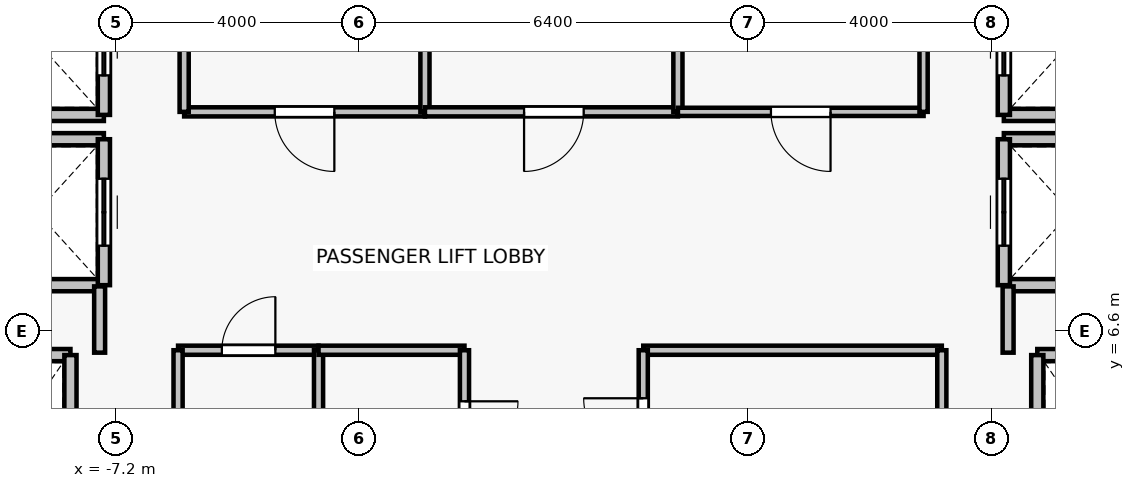
"""IFC4 building model, lengths in metres.
Left out: names, types, materials, properties, quantities, classifications, styles, units other than length and angle.
Written with IfcOpenShell. Run it as: python <this file> out.ifc"""

import sys

from ifc_helpers import new_model, si_unit, direction, frame, frame_2d, origin, place, context, subcontext, project, spatial, rectangle, extrude, source, transform, mapped, element, fill, save


model = new_model("IFC4")
c1 = context("Model", 3, precision=1e-05, world=origin(), true_north=direction((0.0, 1.0)))
c2 = subcontext(c1, "Body", "Model", "MODEL_VIEW")
j1 = project(units=[si_unit("LENGTHUNIT", "METRE"), si_unit("PLANEANGLEUNIT", "RADIAN")], contexts=[c1])
p1 = place(None, origin())
s1 = spatial("IfcSite", under=j1, at=p1, CompositionType="ELEMENT")
p2 = place(p1, origin())
s2 = spatial("IfcBuilding", under=s1, at=p2, CompositionType="ELEMENT")
p3 = place(p2, frame((0.0, 0.0, 225.4)))
s3 = spatial("IfcBuildingStorey", under=s2, at=p3, CompositionType="ELEMENT", Elevation=225.4)
p4 = place(p3, frame((-9.95, 6.2, 0.0), z_axis=(0.0, 0.0, 1.0), x_axis=(1.0, 0.0, 0.0)))
e1 = element("IfcWall", 1, at=p4, inside=s3, PredefinedType="SOLIDWALL", context=c2, shape_type="SweptSolid", body=[
    extrude(rectangle(XDim=2.0, YDim=0.2, at=frame_2d((1.0, 0.0))), origin(), (0.0, 0.0, 1.0), 3.075),
])
p5 = place(p3, frame((-7.95, 6.2, 0.0), z_axis=(0.0, 0.0, 1.0), x_axis=(0.0, -1.0, 0.0)))
e2 = element("IfcWall", 2, at=p5, inside=s3, PredefinedType="SOLIDWALL", context=c2, shape_type="SweptSolid", body=[
    extrude(rectangle(XDim=2.8, YDim=0.2, at=frame_2d((1.4, 0.0))), origin(), (0.0, 0.0, 1.0), 3.075),
])
p6 = place(p3, frame((7.95, 6.2, 0.0), z_axis=(0.0, 0.0, 1.0), x_axis=(1.0, 0.0, 0.0)))
e3 = element("IfcWall", 3, at=p6, inside=s3, PredefinedType="SOLIDWALL", context=c2, shape_type="SweptSolid", body=[
    extrude(rectangle(XDim=2.0, YDim=0.2, at=frame_2d((1.0, 0.0))), origin(), (0.0, 0.0, 1.0), 3.075),
])
p7 = place(p3, frame((7.95, 3.4, 0.0), z_axis=(0.0, 0.0, 1.0), x_axis=(0.0, 1.0, 0.0)))
e4 = element("IfcWall", 4, at=p7, inside=s3, PredefinedType="SOLIDWALL", context=c2, shape_type="SweptSolid", body=[
    extrude(rectangle(XDim=2.8, YDim=0.2, at=frame_2d((1.4, 0.0))), origin(), (0.0, 0.0, 1.0), 3.075),
])
for number, where, z_axis, x_axis in (
    (5, (-7.4, 7.35, 0.0), (0.0, 0.0, 1.0), (-1.0, 0.0, 0.0)),
    (6, (-9.6, 9.75, 0.0), (0.0, 0.0, 1.0), (1.0, 0.0, 0.0)),
):
    element("IfcWall", number, at=place(p3, frame(where, z_axis=z_axis, x_axis=x_axis)), inside=s3, PredefinedType="SOLIDWALL", context=c2, shape_type="SweptSolid", body=[
        extrude(rectangle(XDim=2.2, YDim=0.2, at=frame_2d((1.1, 0.0))), origin(), (0.0, 0.0, 1.0), 2.615),
    ])
p8 = place(p3, frame((-7.4, 9.75, 0.0), z_axis=(0.0, 0.0, 1.0), x_axis=(0.0, -1.0, 0.0)))
e7 = element("IfcWall", 7, at=p8, inside=s3, PredefinedType="SOLIDWALL", context=c2, shape_type="SweptSolid", body=[
    extrude(rectangle(XDim=2.4, YDim=0.2, at=frame_2d((1.2, 0.0))), origin(), (0.0, 0.0, 1.0), 2.615),
])
p9 = place(p8, frame((0.65, 0.0, 0.0)))
e8 = element("IfcOpeningElement", 8, at=p9, cuts=e7, PredefinedType="OPENING", context=c2, shape_type="SweptSolid", body=[
    extrude(rectangle(XDim=1.1, YDim=2.2, at=frame_2d((0.55, 1.1))), frame((0.0, 0.11, 0.0), z_axis=(0.0, -1.0, 0.0), x_axis=(1.0, 0.0, 0.0)), (0.0, 0.0, 1.0), 0.22),
])
p10 = place(p3, frame((-7.4, 10.15, 0.0), z_axis=(0.0, 0.0, 1.0), x_axis=(-1.0, 0.0, 0.0)))
e9 = element("IfcWall", 9, at=p10, inside=s3, PredefinedType="SOLIDWALL", context=c2, shape_type="SweptSolid", body=[
    extrude(rectangle(XDim=2.2, YDim=0.2, at=frame_2d((1.1, 0.0))), origin(), (0.0, 0.0, 1.0), 2.615),
])
p11 = place(p3, frame((-7.4, 12.55, 0.0), z_axis=(0.0, 0.0, 1.0), x_axis=(0.0, -1.0, 0.0)))
e10 = element("IfcWall", 10, at=p11, inside=s3, PredefinedType="SOLIDWALL", context=c2, shape_type="SweptSolid", body=[
    extrude(rectangle(XDim=2.4, YDim=0.2, at=frame_2d((1.2, 0.0))), origin(), (0.0, 0.0, 1.0), 2.615),
])
p12 = place(p11, frame((0.65, 0.0, 0.0)))
e11 = element("IfcOpeningElement", 11, at=p12, cuts=e10, PredefinedType="OPENING", context=c2, shape_type="SweptSolid", body=[
    extrude(rectangle(XDim=1.1, YDim=2.2, at=frame_2d((0.55, 1.1))), frame((0.0, 0.11, 0.0), z_axis=(0.0, -1.0, 0.0), x_axis=(1.0, 0.0, 0.0)), (0.0, 0.0, 1.0), 0.22),
])
for number, where, z_axis, x_axis in (
    (12, (9.6, 7.35, 0.0), (0.0, 0.0, 1.0), (-1.0, 0.0, 0.0)),
    (13, (7.4, 9.75, 0.0), (0.0, 0.0, 1.0), (1.0, 0.0, 0.0)),
):
    element("IfcWall", number, at=place(p3, frame(where, z_axis=z_axis, x_axis=x_axis)), inside=s3, PredefinedType="SOLIDWALL", context=c2, shape_type="SweptSolid", body=[
        extrude(rectangle(XDim=2.2, YDim=0.2, at=frame_2d((1.1, 0.0))), origin(), (0.0, 0.0, 1.0), 2.615),
    ])
p13 = place(p3, frame((7.4, 7.35, 0.0), z_axis=(0.0, 0.0, 1.0), x_axis=(0.0, 1.0, 0.0)))
e14 = element("IfcWall", 14, at=p13, inside=s3, PredefinedType="SOLIDWALL", context=c2, shape_type="SweptSolid", body=[
    extrude(rectangle(XDim=2.4, YDim=0.2, at=frame_2d((1.2, 0.0))), origin(), (0.0, 0.0, 1.0), 2.615),
])
p14 = place(p13, frame((0.65, 0.0, 0.0)))
e15 = element("IfcOpeningElement", 15, at=p14, cuts=e14, PredefinedType="OPENING", context=c2, shape_type="SweptSolid", body=[
    extrude(rectangle(XDim=1.1, YDim=2.2, at=frame_2d((0.55, 1.1))), frame((0.0, 0.11, 0.0), z_axis=(0.0, -1.0, 0.0), x_axis=(1.0, 0.0, 0.0)), (0.0, 0.0, 1.0), 0.22),
])
p15 = place(p3, frame((9.6, 10.15, 0.0), z_axis=(0.0, 0.0, 1.0), x_axis=(-1.0, 0.0, 0.0)))
e16 = element("IfcWall", 16, at=p15, inside=s3, PredefinedType="SOLIDWALL", context=c2, shape_type="SweptSolid", body=[
    extrude(rectangle(XDim=2.2, YDim=0.2, at=frame_2d((1.1, 0.0))), origin(), (0.0, 0.0, 1.0), 2.615),
])
p16 = place(p3, frame((7.4, 10.15, 0.0), z_axis=(0.0, 0.0, 1.0), x_axis=(0.0, 1.0, 0.0)))
e17 = element("IfcWall", 17, at=p16, inside=s3, PredefinedType="SOLIDWALL", context=c2, shape_type="SweptSolid", body=[
    extrude(rectangle(XDim=2.4, YDim=0.2, at=frame_2d((1.2, 0.0))), origin(), (0.0, 0.0, 1.0), 2.615),
])
p17 = place(p16, frame((0.65, 0.0, 0.0)))
e18 = element("IfcOpeningElement", 18, at=p17, cuts=e17, PredefinedType="OPENING", context=c2, shape_type="SweptSolid", body=[
    extrude(rectangle(XDim=1.1, YDim=2.2, at=frame_2d((0.55, 1.1))), frame((0.0, 0.11, 0.0), z_axis=(0.0, -1.0, 0.0), x_axis=(1.0, 0.0, 0.0)), (0.0, 0.0, 1.0), 0.22),
])
for number, where, z_axis, x_axis in (
    (19, (-7.47, 7.33, 0.0), (0.0, 0.0, 1.0), (0.0, -1.0, 0.0)),
    (20, (7.47, 6.24, 0.0), (0.0, 0.0, 1.0), (0.0, 1.0, 0.0)),
):
    element("IfcWall", number, at=place(p3, frame(where, z_axis=z_axis, x_axis=x_axis)), inside=s3, PredefinedType="PARTITIONING", context=c2, shape_type="SweptSolid", body=[
        extrude(rectangle(XDim=1.09, YDim=0.18, at=frame_2d((0.545, 0.0))), origin(), (0.0, 0.0, 1.0), 2.615),
    ])
p18 = place(p3, frame((-2.12, 10.2, 0.0), z_axis=(0.0, 0.0, 1.0), x_axis=(-1.0, 0.0, 0.0)))
e21 = element("IfcWall", 21, at=p18, inside=s3, PredefinedType="PARTITIONING", context=c2, shape_type="SweptSolid", body=[
    extrude(rectangle(XDim=3.96, YDim=0.15, at=frame_2d((1.98, 0.0))), origin(), (0.0, 0.0, 1.0), 3.075),
])
p19 = place(p18, frame((1.49, 0.0, 0.0)))
e22 = element("IfcOpeningElement", 22, at=p19, cuts=e21, PredefinedType="OPENING", context=c2, shape_type="SweptSolid", body=[
    extrude(rectangle(XDim=0.98, YDim=2.15, at=frame_2d((0.49, 1.075))), frame((0.0, 0.085, 0.0), z_axis=(0.0, -1.0, 0.0), x_axis=(1.0, 0.0, 0.0)), (0.0, 0.0, 1.0), 0.17),
])
for number, where, z_axis, x_axis in (
    (23, (-6.08, 10.2, 0.0), (0.0, 0.0, 1.0), (0.0, 1.0, 0.0)),
    (24, (-2.12, 13.0, 0.0), (0.0, 0.0, 1.0), (0.0, -1.0, 0.0)),
):
    element("IfcWall", number, at=place(p3, frame(where, z_axis=z_axis, x_axis=x_axis)), inside=s3, PredefinedType="PARTITIONING", context=c2, shape_type="SweptSolid", body=[
        extrude(rectangle(XDim=2.8, YDim=0.15, at=frame_2d((1.4, 0.0))), origin(), (0.0, 0.0, 1.0), 3.075),
    ])
p20 = place(p3, frame((2.04, 10.2, 0.0), z_axis=(0.0, 0.0, 1.0), x_axis=(-1.0, 0.0, 0.0)))
e25 = element("IfcWall", 25, at=p20, inside=s3, PredefinedType="PARTITIONING", context=c2, shape_type="SweptSolid", body=[
    extrude(rectangle(XDim=4.16, YDim=0.15, at=frame_2d((2.08, 0.0))), origin(), (0.0, 0.0, 1.0), 3.075),
])
p21 = place(p20, frame((1.55, 0.0, 0.0)))
e26 = element("IfcOpeningElement", 26, at=p21, cuts=e25, PredefinedType="OPENING", context=c2, shape_type="SweptSolid", body=[
    extrude(rectangle(XDim=0.98, YDim=2.15, at=frame_2d((0.49, 1.075))), frame((0.0, 0.085, 0.0), z_axis=(0.0, -1.0, 0.0), x_axis=(1.0, 0.0, 0.0)), (0.0, 0.0, 1.0), 0.17),
])
p22 = place(p3, frame((2.04, 13.0, 0.0), z_axis=(0.0, 0.0, 1.0), x_axis=(0.0, -1.0, 0.0)))
e27 = element("IfcWall", 27, at=p22, inside=s3, PredefinedType="PARTITIONING", context=c2, shape_type="SweptSolid", body=[
    extrude(rectangle(XDim=2.8, YDim=0.15, at=frame_2d((1.4, 0.0))), origin(), (0.0, 0.0, 1.0), 3.075),
])
p23 = place(p3, frame((6.08, 10.2, 0.0), z_axis=(0.0, 0.0, 1.0), x_axis=(-1.0, 0.0, 0.0)))
e28 = element("IfcWall", 28, at=p23, inside=s3, PredefinedType="PARTITIONING", context=c2, shape_type="SweptSolid", body=[
    extrude(rectangle(XDim=4.04, YDim=0.135, at=frame_2d((2.02, 0.0))), origin(), (0.0, 0.0, 1.0), 3.075),
])
p24 = place(p23, frame((1.53, 0.0, 0.0)))
e29 = element("IfcOpeningElement", 29, at=p24, cuts=e28, PredefinedType="OPENING", context=c2, shape_type="SweptSolid", body=[
    extrude(rectangle(XDim=0.98, YDim=2.15, at=frame_2d((0.49, 1.075))), frame((0.0, 0.077, 0.0), z_axis=(0.0, -1.0, 0.0), x_axis=(1.0, 0.0, 0.0)), (0.0, 0.0, 1.0), 0.155),
])
p25 = place(p3, frame((6.08, 13.0, 0.0), z_axis=(0.0, 0.0, 1.0), x_axis=(0.0, -1.0, 0.0)))
e30 = element("IfcWall", 30, at=p25, inside=s3, PredefinedType="PARTITIONING", context=c2, shape_type="SweptSolid", body=[
    extrude(rectangle(XDim=2.8, YDim=0.135, at=frame_2d((1.4, 0.0))), origin(), (0.0, 0.0, 1.0), 3.075),
])
p26 = place(p3, frame((-6.18, 6.28, 0.0), z_axis=(0.0, 0.0, 1.0), x_axis=(1.0, 0.0, 0.0)))
e31 = element("IfcWall", 31, at=p26, inside=s3, PredefinedType="PARTITIONING", context=c2, shape_type="SweptSolid", body=[
    extrude(rectangle(XDim=2.31, YDim=0.15, at=frame_2d((1.155, 0.0))), origin(), (0.0, 0.0, 1.0), 3.075),
])
p27 = place(p26, frame((0.72, 0.0, 0.0)))
e32 = element("IfcOpeningElement", 32, at=p27, cuts=e31, PredefinedType="OPENING", context=c2, shape_type="SweptSolid", body=[
    extrude(rectangle(XDim=0.88, YDim=2.1, at=frame_2d((0.44, 1.05))), frame((0.0, 0.085, 0.0), z_axis=(0.0, -1.0, 0.0), x_axis=(1.0, 0.0, 0.0)), (0.0, 0.0, 1.0), 0.17),
])
for number, where, z_axis, x_axis in (
    (33, (-6.18, 3.76, 0.0), (0.0, 0.0, 1.0), (0.0, 1.0, 0.0)),
    (34, (-3.87, 6.28, 0.0), (0.0, 0.0, 1.0), (0.0, -1.0, 0.0)),
):
    element("IfcWall", number, at=place(p3, frame(where, z_axis=z_axis, x_axis=x_axis)), inside=s3, PredefinedType="PARTITIONING", context=c2, shape_type="SweptSolid", body=[
        extrude(rectangle(XDim=2.52, YDim=0.15, at=frame_2d((1.26, 0.0))), origin(), (0.0, 0.0, 1.0), 3.075),
    ])
p28 = place(p3, frame((-3.87, 6.28, 0.0), z_axis=(0.0, 0.0, 1.0), x_axis=(1.0, 0.0, 0.0)))
e35 = element("IfcWall", 35, at=p28, inside=s3, PredefinedType="PARTITIONING", context=c2, shape_type="SweptSolid", body=[
    extrude(rectangle(XDim=2.4, YDim=0.15, at=frame_2d((1.2, 0.0))), origin(), (0.0, 0.0, 1.0), 3.075),
])
p29 = place(p3, frame((-1.47, 6.28, 0.0), z_axis=(0.0, 0.0, 1.0), x_axis=(0.0, -1.0, 0.0)))
e36 = element("IfcWall", 36, at=p29, inside=s3, PredefinedType="PARTITIONING", context=c2, shape_type="SweptSolid", body=[
    extrude(rectangle(XDim=2.52, YDim=0.15, at=frame_2d((1.26, 0.0))), origin(), (0.0, 0.0, 1.0), 3.075),
])
p30 = place(p29, frame((0.84, 0.0, 0.0)))
e37 = element("IfcOpeningElement", 37, at=p30, cuts=e36, PredefinedType="OPENING", context=c2, shape_type="SweptSolid", body=[
    extrude(rectangle(XDim=0.88, YDim=2.1, at=frame_2d((0.44, 1.05))), frame((0.0, 0.085, 0.0), z_axis=(0.0, -1.0, 0.0), x_axis=(1.0, 0.0, 0.0)), (0.0, 0.0, 1.0), 0.17),
])
p31 = place(p3, frame((1.47, 6.28, 0.0), z_axis=(0.0, 0.0, 1.0), x_axis=(1.0, 0.0, 0.0)))
e38 = element("IfcWall", 38, at=p31, inside=s3, PredefinedType="PARTITIONING", context=c2, shape_type="SweptSolid", body=[
    extrude(rectangle(XDim=4.91, YDim=0.15, at=frame_2d((2.455, 0.0))), origin(), (0.0, 0.0, 1.0), 3.075),
])
p32 = place(p3, frame((1.47, 3.76, 0.0), z_axis=(0.0, 0.0, 1.0), x_axis=(0.0, 1.0, 0.0)))
e39 = element("IfcWall", 39, at=p32, inside=s3, PredefinedType="PARTITIONING", context=c2, shape_type="SweptSolid", body=[
    extrude(rectangle(XDim=2.52, YDim=0.15, at=frame_2d((1.26, 0.0))), origin(), (0.0, 0.0, 1.0), 3.075),
])
p33 = place(p32, frame((0.75, 0.0, 0.0)))
e40 = element("IfcOpeningElement", 40, at=p33, cuts=e39, PredefinedType="OPENING", context=c2, shape_type="SweptSolid", body=[
    extrude(rectangle(XDim=0.98, YDim=2.15, at=frame_2d((0.49, 1.075))), frame((0.0, 0.085, 0.0), z_axis=(0.0, -1.0, 0.0), x_axis=(1.0, 0.0, 0.0)), (0.0, 0.0, 1.0), 0.17),
])
p34 = place(p3, frame((6.38, 6.28, 0.0), z_axis=(0.0, 0.0, 1.0), x_axis=(0.0, -1.0, 0.0)))
e41 = element("IfcWall", 41, at=p34, inside=s3, PredefinedType="PARTITIONING", context=c2, shape_type="SweptSolid", body=[
    extrude(rectangle(XDim=2.52, YDim=0.15, at=frame_2d((1.26, 0.0))), origin(), (0.0, 0.0, 1.0), 3.075),
])
m1 = source(origin(), c2, "Body", "SweptSolid", [
    extrude(rectangle(XDim=1.1, YDim=2.2, at=frame_2d((0.55, 1.1))), frame((0.0, 0.025, 0.0), z_axis=(0.0, -1.0, 0.0), x_axis=(1.0, 0.0, 0.0)), (0.0, 0.0, 1.0), 0.05),
])
p35 = place(p9, origin())
e42 = element("IfcDoor", 42, at=p35, inside=s3, OperationType="DOUBLE_DOOR_SLIDING", PredefinedType="DOOR", context=c2, shape_type="MappedRepresentation", body=[
    mapped(m1, transform((0.0, 0.0, 0.0), x_axis=(1.0, 0.0, 0.0), y_axis=(0.0, 1.0, 0.0), z_axis=(0.0, 0.0, 1.0), scale=1.0)),
])
fill(e8, e42)
p36 = place(p12, origin())
e43 = element("IfcDoor", 43, at=p36, inside=s3, OperationType="DOUBLE_DOOR_SLIDING", PredefinedType="DOOR", context=c2, shape_type="MappedRepresentation", body=[
    mapped(m1, transform((0.0, 0.0, 0.0), x_axis=(1.0, 0.0, 0.0), y_axis=(0.0, 1.0, 0.0), z_axis=(0.0, 0.0, 1.0), scale=1.0)),
])
fill(e11, e43)
p37 = place(p14, origin())
e44 = element("IfcDoor", 44, at=p37, inside=s3, OperationType="DOUBLE_DOOR_SLIDING", PredefinedType="DOOR", context=c2, shape_type="MappedRepresentation", body=[
    mapped(m1, transform((0.0, 0.0, 0.0), x_axis=(1.0, 0.0, 0.0), y_axis=(0.0, 1.0, 0.0), z_axis=(0.0, 0.0, 1.0), scale=1.0)),
])
fill(e15, e44)
p38 = place(p17, origin())
e45 = element("IfcDoor", 45, at=p38, inside=s3, OperationType="DOUBLE_DOOR_SLIDING", PredefinedType="DOOR", context=c2, shape_type="MappedRepresentation", body=[
    mapped(m1, transform((0.0, 0.0, 0.0), x_axis=(1.0, 0.0, 0.0), y_axis=(0.0, 1.0, 0.0), z_axis=(0.0, 0.0, 1.0), scale=1.0)),
])
fill(e18, e45)
m2 = source(origin(), c2, "Body", "SweptSolid", [
    extrude(rectangle(XDim=0.98, YDim=2.15, at=frame_2d((0.49, 1.075))), frame((0.0, 0.025, 0.0), z_axis=(0.0, -1.0, 0.0), x_axis=(1.0, 0.0, 0.0)), (0.0, 0.0, 1.0), 0.05),
])
p39 = place(p19, origin())
e46 = element("IfcDoor", 46, at=p39, inside=s3, OperationType="SINGLE_SWING_LEFT", PredefinedType="DOOR", context=c2, shape_type="MappedRepresentation", body=[
    mapped(m2, transform((0.0, 0.0, 0.0), x_axis=(1.0, 0.0, 0.0), y_axis=(0.0, 1.0, 0.0), z_axis=(0.0, 0.0, 1.0), scale=1.0)),
])
fill(e22, e46)
p40 = place(p21, origin())
e47 = element("IfcDoor", 47, at=p40, inside=s3, OperationType="SINGLE_SWING_RIGHT", PredefinedType="DOOR", context=c2, shape_type="MappedRepresentation", body=[
    mapped(m2, transform((0.0, 0.0, 0.0), x_axis=(1.0, 0.0, 0.0), y_axis=(0.0, 1.0, 0.0), z_axis=(0.0, 0.0, 1.0), scale=1.0)),
])
fill(e26, e47)
p41 = place(p24, origin())
e48 = element("IfcDoor", 48, at=p41, inside=s3, OperationType="SINGLE_SWING_LEFT", PredefinedType="DOOR", context=c2, shape_type="MappedRepresentation", body=[
    mapped(m2, transform((0.0, 0.0, 0.0), x_axis=(1.0, 0.0, 0.0), y_axis=(0.0, 1.0, 0.0), z_axis=(0.0, 0.0, 1.0), scale=1.0)),
])
fill(e29, e48)
m3 = source(origin(), c2, "Body", "SweptSolid", [
    extrude(rectangle(XDim=0.88, YDim=2.1, at=frame_2d((0.44, 1.05))), frame((0.0, 0.025, 0.0), z_axis=(0.0, -1.0, 0.0), x_axis=(1.0, 0.0, 0.0)), (0.0, 0.0, 1.0), 0.05),
])
p42 = place(p27, origin())
e49 = element("IfcDoor", 49, at=p42, inside=s3, OperationType="SINGLE_SWING_RIGHT", PredefinedType="DOOR", context=c2, shape_type="MappedRepresentation", body=[
    mapped(m3, transform((0.0, 0.0, 0.0), x_axis=(1.0, 0.0, 0.0), y_axis=(0.0, 1.0, 0.0), z_axis=(0.0, 0.0, 1.0), scale=1.0)),
])
fill(e32, e49)
p43 = place(p30, origin())
e50 = element("IfcDoor", 50, at=p43, inside=s3, OperationType="SINGLE_SWING_LEFT", PredefinedType="DOOR", context=c2, shape_type="MappedRepresentation", body=[
    mapped(m3, transform((0.0, 0.0, 0.0), x_axis=(1.0, 0.0, 0.0), y_axis=(0.0, 1.0, 0.0), z_axis=(0.0, 0.0, 1.0), scale=1.0)),
])
fill(e37, e50)
p44 = place(p33, origin())
e51 = element("IfcDoor", 51, at=p44, inside=s3, OperationType="SINGLE_SWING_RIGHT", PredefinedType="DOOR", context=c2, shape_type="MappedRepresentation", body=[
    mapped(m2, transform((0.0, 0.0, 0.0), x_axis=(1.0, 0.0, 0.0), y_axis=(0.0, 1.0, 0.0), z_axis=(0.0, 0.0, 1.0), scale=1.0)),
])
fill(e40, e51)
save(model, sys.argv[1])
